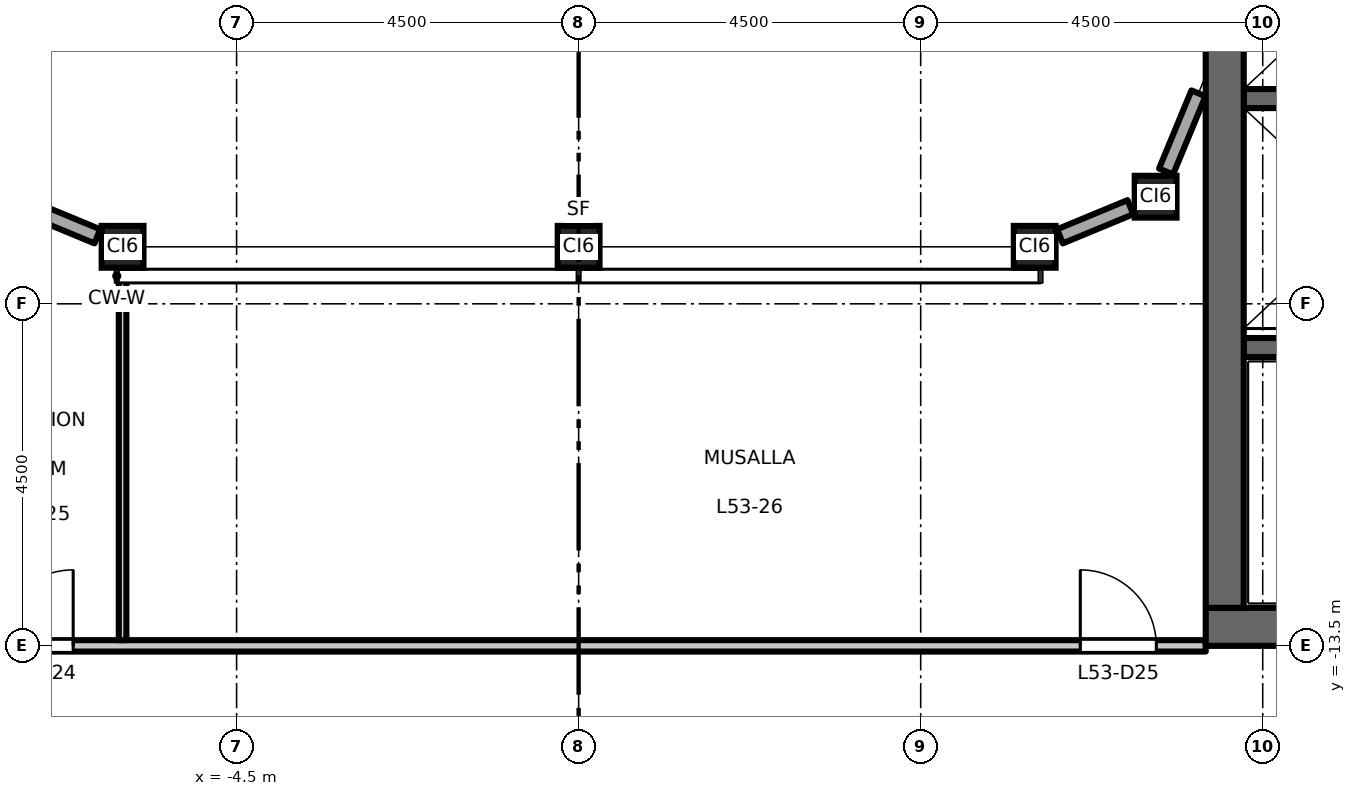
"""IFC4 building model, lengths in metres.
Left out: names, types, materials, properties, quantities, classifications, styles, units other than length and angle.
Written with IfcOpenShell. Run it as: python <this file> out.ifc"""

import sys

from ifc_helpers import new_model, si_unit, direction, frame, frame_2d, origin, origin_2d, place, context, subcontext, project, spatial, rectangle, hollow_rectangle, extrude, element, fill, save


model = new_model("IFC4")
c1 = context("Model", 3, precision=1e-05, world=origin(), true_north=direction((0.0, 1.0)))
c2 = subcontext(c1, "Body", "Model", "MODEL_VIEW")
j1 = project(units=[si_unit("LENGTHUNIT", "METRE"), si_unit("PLANEANGLEUNIT", "RADIAN")], contexts=[c1])
p1 = place(None, origin())
s1 = spatial("IfcSite", under=j1, at=p1, CompositionType="ELEMENT")
p2 = place(p1, origin())
s2 = spatial("IfcBuilding", under=s1, at=p2, CompositionType="ELEMENT")
p3 = place(p2, frame((0.0, 0.0, 246.7)))
s3 = spatial("IfcBuildingStorey", under=s2, at=p3, CompositionType="ELEMENT", Elevation=246.7)
for number, where, z_axis, x_axis in (
    (1, (-6.0, -8.25, 0.0), (0.0, 0.0, 1.0), (1.0, 0.0, 0.0)),
    (2, (0.0, -8.25, 0.0), (0.0, 0.0, 1.0), (1.0, 0.0, 0.0)),
    (3, (6.0, -8.25, 0.0), (0.0, 0.0, 1.0), (1.0, 0.0, 0.0)),
    (4, (7.591, -7.591, 0.0), (0.0, 0.0, 1.0), (1.0, 0.0, 0.0)),
):
    element("IfcColumn", number, at=place(p3, frame(where, z_axis=z_axis, x_axis=x_axis)), inside=s3, PredefinedType="COLUMN", context=c2, shape_type="SweptSolid", body=[
        extrude(hollow_rectangle(XDim=0.55, YDim=0.55, WallThickness=0.028, at=origin_2d()), origin(), (0.0, 0.0, 1.0), 4.5),
    ])
p4 = place(p3, frame((8.75, -6.3, 0.0), z_axis=(0.0, 0.0, 1.0), x_axis=(1.0, 0.0, 0.0)))
e5 = element("IfcWall", 5, at=p4, inside=s3, PredefinedType="SHEAR", context=c2, shape_type="SweptSolid", body=[
    extrude(rectangle(XDim=3.1, YDim=0.25, at=frame_2d((1.55, 0.0))), origin(), (0.0, 0.0, 1.0), 4.35),
])
p5 = place(p3, frame((8.75, -9.575, 0.0), z_axis=(0.0, 0.0, 1.0), x_axis=(1.0, 0.0, 0.0)))
e6 = element("IfcWall", 6, at=p5, inside=s3, PredefinedType="SHEAR", context=c2, shape_type="SweptSolid", body=[
    extrude(rectangle(XDim=8.0, YDim=0.25, at=frame_2d((4.0, 0.0))), origin(), (0.0, 0.0, 1.0), 4.35),
])
p6 = place(p5, frame((6.65, 0.0, 0.0)))
e7 = element("IfcOpeningElement", 7, at=p6, cuts=e6, PredefinedType="OPENING", context=c2, shape_type="SweptSolid", body=[
    extrude(rectangle(XDim=1.1, YDim=2.1, at=frame_2d((0.55, 1.05))), frame((0.0, 0.135, 0.0), z_axis=(0.0, -1.0, 0.0), x_axis=(1.0, 0.0, 0.0)), (0.0, 0.0, 1.0), 0.27),
])
p7 = place(p3, frame((8.25, -13.25, 0.0), z_axis=(0.0, 0.0, 1.0), x_axis=(1.0, 0.0, 0.0)))
e8 = element("IfcWall", 8, at=p7, inside=s3, PredefinedType="SHEAR", context=c2, shape_type="SweptSolid", body=[
    extrude(rectangle(XDim=13.5, YDim=0.5, at=frame_2d((6.75, 0.0))), origin(), (0.0, 0.0, 1.0), 4.35),
])
p8 = place(p3, frame((8.5, -13.0, 0.0), z_axis=(0.0, 0.0, 1.0), x_axis=(0.0, 1.0, 0.0)))
e9 = element("IfcWall", 9, at=p8, inside=s3, PredefinedType="SHEAR", context=c2, shape_type="SweptSolid", body=[
    extrude(rectangle(XDim=26.0, YDim=0.5, at=frame_2d((13.0, 0.0))), origin(), (0.0, 0.0, 1.0), 4.35),
])
p9 = place(p3, frame((6.332, -8.113, 0.0), z_axis=(0.0, 0.0, 1.0), x_axis=(0.923859650767, 0.382731427616, 0.0)))
e10 = element("IfcWall", 10, at=p9, inside=s3, PredefinedType="STANDARD", context=c2, shape_type="SweptSolid", body=[
    extrude(rectangle(XDim=1.003, YDim=0.2, at=frame_2d((0.502, 0.0))), origin(), (0.0, 0.0, 1.0), 3.918),
])
p10 = place(p3, frame((7.729, -7.259, 0.0), z_axis=(0.0, 0.0, 1.0), x_axis=(0.382635994082, 0.923899180665, 0.0)))
e11 = element("IfcWall", 11, at=p10, inside=s3, PredefinedType="STANDARD", context=c2, shape_type="SweptSolid", body=[
    extrude(rectangle(XDim=1.113, YDim=0.2, at=frame_2d((0.556, 0.0))), origin(), (0.0, 0.0, 1.0), 3.918),
])
p11 = place(p3, frame((-7.259, -7.729, 0.0), z_axis=(0.0, 0.0, 1.0), x_axis=(0.923859650767, -0.382731427616, 0.0)))
e12 = element("IfcWall", 12, at=p11, inside=s3, PredefinedType="STANDARD", context=c2, shape_type="SweptSolid", body=[
    extrude(rectangle(XDim=1.003, YDim=0.2, at=frame_2d((0.502, 0.0))), origin(), (0.0, 0.0, 1.0), 3.918),
])
p12 = place(p3, frame((-8.25, -13.5, 0.0), z_axis=(0.0, 0.0, 1.0), x_axis=(1.0, 0.0, 0.0)))
e13 = element("IfcWall", 13, at=p12, inside=s3, PredefinedType="PARTITIONING", context=c2, shape_type="SweptSolid", body=[
    extrude(rectangle(XDim=16.5, YDim=0.15, at=frame_2d((8.25, 0.0))), origin(), (0.0, 0.0, 1.0), 3.95),
])
p13 = place(p12, frame((0.6, 0.0, 0.0)))
e14 = element("IfcOpeningElement", 14, at=p13, cuts=e13, PredefinedType="OPENING", context=c2, shape_type="SweptSolid", body=[
    extrude(rectangle(XDim=1.0, YDim=2.1, at=frame_2d((0.5, 1.05))), frame((0.0, 0.085, 0.0), z_axis=(0.0, -1.0, 0.0), x_axis=(1.0, 0.0, 0.0)), (0.0, 0.0, 1.0), 0.17),
])
p14 = place(p12, frame((14.85, 0.0, 0.0)))
e15 = element("IfcOpeningElement", 15, at=p14, cuts=e13, PredefinedType="OPENING", context=c2, shape_type="SweptSolid", body=[
    extrude(rectangle(XDim=1.0, YDim=2.1, at=frame_2d((0.5, 1.05))), frame((0.0, 0.085, 0.0), z_axis=(0.0, -1.0, 0.0), x_axis=(1.0, 0.0, 0.0)), (0.0, 0.0, 1.0), 0.17),
])
p15 = place(p3, frame((-6.0, -13.425, 0.0), z_axis=(0.0, 0.0, 1.0), x_axis=(0.0, 1.0, 0.0)))
e16 = element("IfcWall", 16, at=p15, inside=s3, PredefinedType="PARTITIONING", context=c2, shape_type="SweptSolid", body=[
    extrude(rectangle(XDim=4.825, YDim=0.1, at=frame_2d((2.413, 0.0))), origin(), (0.0, 0.0, 1.0), 4.35),
])
p16 = place(p13, origin())
e17 = element("IfcDoor", 17, at=p16, inside=s3, OperationType="SINGLE_SWING_RIGHT", PredefinedType="DOOR", context=c2, shape_type="SweptSolid", body=[
    extrude(rectangle(XDim=1.0, YDim=2.1, at=frame_2d((0.5, 1.05))), frame((0.0, 0.025, 0.0), z_axis=(0.0, -1.0, 0.0), x_axis=(1.0, 0.0, 0.0)), (0.0, 0.0, 1.0), 0.05),
])
fill(e14, e17)
p17 = place(p14, origin())
e18 = element("IfcDoor", 18, at=p17, inside=s3, OperationType="SINGLE_SWING_LEFT", PredefinedType="DOOR", context=c2, shape_type="SweptSolid", body=[
    extrude(rectangle(XDim=1.0, YDim=2.1, at=frame_2d((0.5, 1.05))), frame((0.0, 0.025, 0.0), z_axis=(0.0, -1.0, 0.0), x_axis=(1.0, 0.0, 0.0)), (0.0, 0.0, 1.0), 0.05),
])
fill(e15, e18)
save(model, sys.argv[1])
